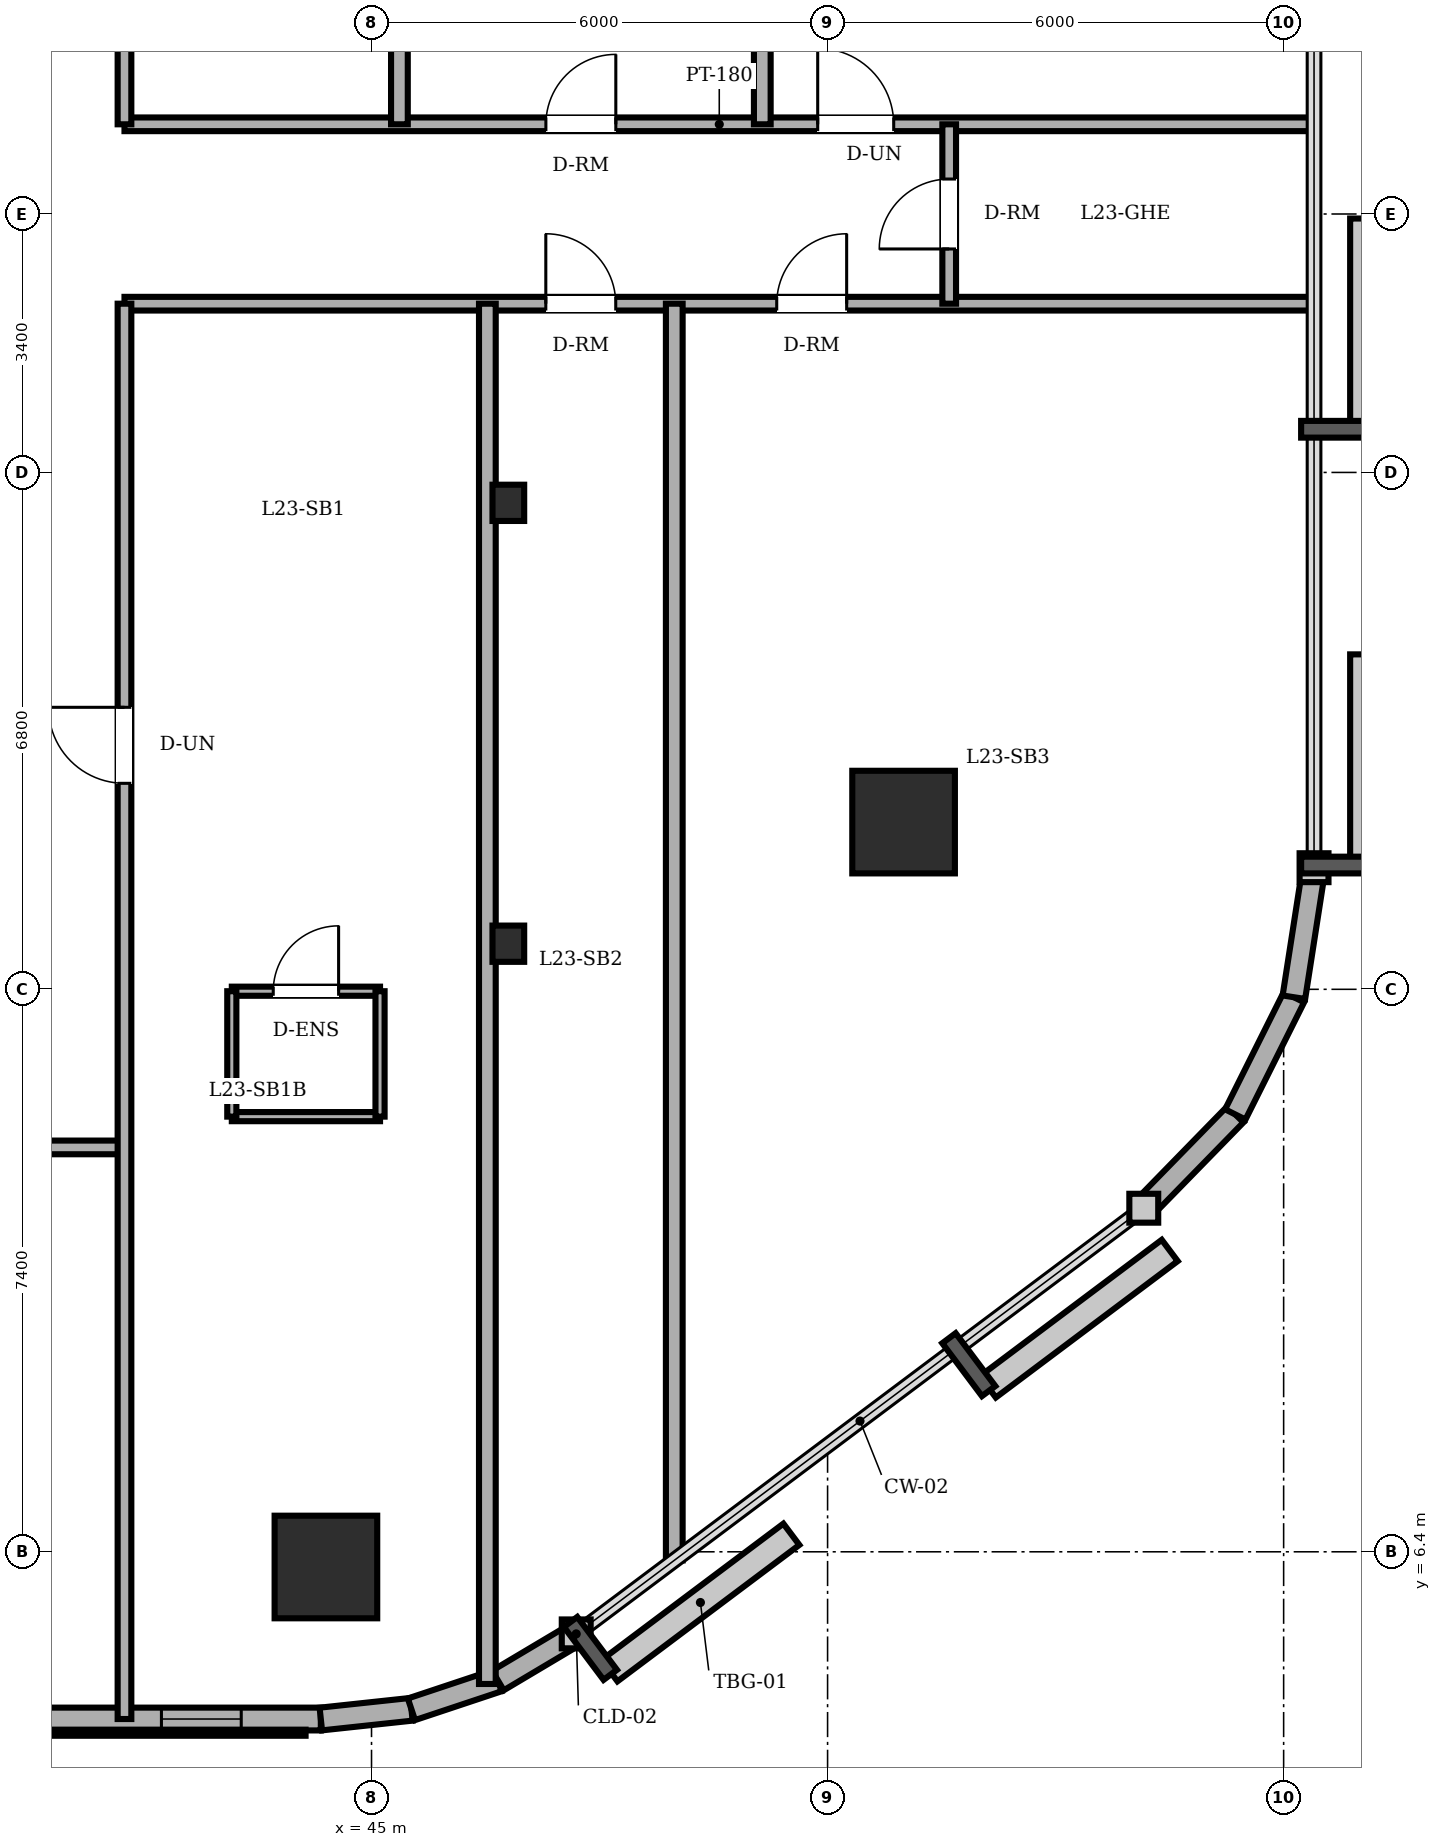
"""IFC4 building model, lengths in metres.
Left out: names, types, materials, properties, quantities, classifications, styles, units other than length and angle.
Written with IfcOpenShell. Run it as: python <this file> out.ifc"""

import sys

from ifc_helpers import new_model, si_unit, direction, frame, frame_2d, origin, origin_2d, place, context, subcontext, project, spatial, rectangle, circle, i_section, extrude, element, fill, save


model = new_model("IFC4")
c1 = context("Model", 3, precision=1e-05, world=origin(), true_north=direction((0.0, 1.0)))
c2 = subcontext(c1, "Body", "Model", "MODEL_VIEW")
j1 = project(units=[si_unit("LENGTHUNIT", "METRE"), si_unit("PLANEANGLEUNIT", "RADIAN")], contexts=[c1])
p1 = place(None, origin())
s1 = spatial("IfcSite", under=j1, at=p1, CompositionType="ELEMENT")
p2 = place(p1, origin())
s2 = spatial("IfcBuilding", under=s1, at=p2, CompositionType="ELEMENT")
p3 = place(p2, frame((0.0, 0.0, 89.9)))
s3 = spatial("IfcBuildingStorey", under=s2, at=p3, CompositionType="ELEMENT", Elevation=89.9)
for number, where, z_axis, x_axis in (
    (1, (44.4, 6.2, 0.0), (0.0, 0.0, 1.0), (1.0, 0.0, 0.0)),
    (2, (52.0, 16.0, 0.0), (0.0, 0.0, 1.0), (1.0, 0.0, 0.0)),
):
    element("IfcColumn", number, at=place(p3, frame(where, z_axis=z_axis, x_axis=x_axis)), inside=s3, PredefinedType="COLUMN", context=c2, shape_type="SweptSolid", body=[
        extrude(circle(Radius=0.675, at=origin_2d()), origin(), (0.0, 0.0, 1.0), 3.6),
    ])
for number, where, z_axis, x_axis in (
    (3, (46.8, 14.4, 0.0), (0.0, 0.0, 1.0), (1.0, 0.0, 0.0)),
    (4, (46.8, 20.2, 0.0), (0.0, 0.0, 1.0), (1.0, 0.0, 0.0)),
):
    element("IfcColumn", number, at=place(p3, frame(where, z_axis=z_axis, x_axis=x_axis)), inside=s3, PredefinedType="COLUMN", context=c2, shape_type="SweptSolid", body=[
        extrude(i_section(OverallWidth=0.417, OverallDepth=0.477, WebThickness=0.036, FlangeThickness=0.057, FilletRadius=0.015, at=origin_2d()), origin(), (0.0, 0.0, 1.0), 3.6),
    ])
p4 = place(p3, frame((14.4, 4.2, 0.0), z_axis=(0.0, 0.0, 1.0), x_axis=(1.0, 0.0, 0.0)))
e5 = element("IfcWall", 5, at=p4, inside=s3, PredefinedType="SOLIDWALL", context=c2, shape_type="SweptSolid", body=[
    extrude(rectangle(XDim=29.933, YDim=0.3, at=frame_2d((14.967, 0.0))), origin(), (0.0, 0.0, 1.0), 3.4),
])
p5 = place(p4, frame((6.425, 0.0, 0.0)))
e6 = element("IfcOpeningElement", 6, at=p5, cuts=e5, PredefinedType="OPENING", context=c2, shape_type="SweptSolid", body=[
    extrude(rectangle(XDim=0.95, YDim=2.2, at=frame_2d((0.475, 1.1))), frame((0.0, 0.16, 0.0), z_axis=(0.0, -1.0, 0.0), x_axis=(1.0, 0.0, 0.0)), (0.0, 0.0, 1.0), 0.32),
])
p6 = place(p4, frame((2.342, 0.0, 0.85)))
e7 = element("IfcOpeningElement", 7, at=p6, cuts=e5, PredefinedType="OPENING", context=c2, shape_type="SweptSolid", body=[
    extrude(rectangle(XDim=1.65, YDim=1.55, at=frame_2d((0.825, 0.775))), frame((0.0, 0.16, 0.0), z_axis=(0.0, -1.0, 0.0), x_axis=(1.0, 0.0, 0.0)), (0.0, 0.0, 1.0), 0.32),
])
p7 = place(p4, frame((9.875, 0.0, 0.85)))
e8 = element("IfcOpeningElement", 8, at=p7, cuts=e5, PredefinedType="OPENING", context=c2, shape_type="SweptSolid", body=[
    extrude(rectangle(XDim=1.65, YDim=1.55, at=frame_2d((0.825, 0.775))), frame((0.0, 0.16, 0.0), z_axis=(0.0, -1.0, 0.0), x_axis=(1.0, 0.0, 0.0)), (0.0, 0.0, 1.0), 0.32),
])
p8 = place(p4, frame((16.692, 0.0, 0.85)))
e9 = element("IfcOpeningElement", 9, at=p8, cuts=e5, PredefinedType="OPENING", context=c2, shape_type="SweptSolid", body=[
    extrude(rectangle(XDim=1.65, YDim=1.55, at=frame_2d((0.825, 0.775))), frame((0.0, 0.16, 0.0), z_axis=(0.0, -1.0, 0.0), x_axis=(1.0, 0.0, 0.0)), (0.0, 0.0, 1.0), 0.32),
])
p9 = place(p4, frame((21.608, 0.0, 0.85)))
e10 = element("IfcOpeningElement", 10, at=p9, cuts=e5, PredefinedType="OPENING", context=c2, shape_type="SweptSolid", body=[
    extrude(rectangle(XDim=1.65, YDim=1.55, at=frame_2d((0.825, 0.775))), frame((0.0, 0.16, 0.0), z_axis=(0.0, -1.0, 0.0), x_axis=(1.0, 0.0, 0.0)), (0.0, 0.0, 1.0), 0.32),
])
p10 = place(p4, frame((27.836, 0.0, 0.85)))
e11 = element("IfcOpeningElement", 11, at=p10, cuts=e5, PredefinedType="OPENING", context=c2, shape_type="SweptSolid", body=[
    extrude(rectangle(XDim=1.05, YDim=1.55, at=frame_2d((0.525, 0.775))), frame((0.0, 0.16, 0.0), z_axis=(0.0, -1.0, 0.0), x_axis=(1.0, 0.0, 0.0)), (0.0, 0.0, 1.0), 0.32),
])
p11 = place(p3, frame((44.333, 4.2, 0.0), z_axis=(0.0, 0.0, 1.0), x_axis=(0.994289103787, 0.106720092254, 0.0)))
e12 = element("IfcWall", 12, at=p11, inside=s3, PredefinedType="SOLIDWALL", context=c2, shape_type="SweptSolid", body=[
    extrude(rectangle(XDim=1.199, YDim=0.3, at=frame_2d((0.599, 0.0))), origin(), (0.0, 0.0, 1.0), 3.4),
])
p12 = place(p3, frame((45.525, 4.328, 0.0), z_axis=(0.0, 0.0, 1.0), x_axis=(0.948744332129, 0.316044604847, 0.0)))
e13 = element("IfcWall", 13, at=p12, inside=s3, PredefinedType="SOLIDWALL", context=c2, shape_type="SweptSolid", body=[
    extrude(rectangle(XDim=1.2, YDim=0.3, at=frame_2d((0.6, 0.0))), origin(), (0.0, 0.0, 1.0), 3.4),
])
p13 = place(p3, frame((46.663, 4.707, 0.0), z_axis=(0.0, 0.0, 1.0), x_axis=(0.859320591642, 0.511437308749, 0.0)))
e14 = element("IfcWall", 14, at=p13, inside=s3, PredefinedType="SOLIDWALL", context=c2, shape_type="SweptSolid", body=[
    extrude(rectangle(XDim=1.199, YDim=0.3, at=frame_2d((0.599, 0.0))), origin(), (0.0, 0.0, 1.0), 3.4),
])
for number, where, z_axis, x_axis in (
    (15, (55.16, 10.92, 0.0), (0.0, 0.0, 1.0), (0.698, 0.716, 0.0)),
    (16, (56.364, 12.154, 0.0), (0.0, 0.0, 1.0), (0.447, 0.894, 0.0)),
):
    element("IfcWall", number, at=place(p3, frame(where, z_axis=z_axis, x_axis=x_axis)), inside=s3, PredefinedType="SOLIDWALL", context=c2, shape_type="SweptSolid", body=[
        extrude(rectangle(XDim=1.724, YDim=0.3, at=frame_2d((0.862, 0.0))), origin(), (0.0, 0.0, 1.0), 3.4),
    ])
p14 = place(p3, frame((57.135, 13.696, 0.0), z_axis=(0.0, 0.0, 1.0), x_axis=(0.153620989032, 0.988129845581, 0.0)))
e17 = element("IfcWall", 17, at=p14, inside=s3, PredefinedType="SOLIDWALL", context=c2, shape_type="SweptSolid", body=[
    extrude(rectangle(XDim=1.724, YDim=0.3, at=frame_2d((0.862, 0.0))), origin(), (0.0, 0.0, 1.0), 3.4),
])
p15 = place(p3, frame((43.162, 13.775, 0.0), z_axis=(0.0, 0.0, 1.0), x_axis=(1.0, 0.0, 0.0)))
e18 = element("IfcWall", 18, at=p15, inside=s3, PredefinedType="PARTITIONING", context=c2, shape_type="SweptSolid", body=[
    extrude(rectangle(XDim=1.95, YDim=0.12, at=frame_2d((0.975, 0.0))), origin(), (0.0, 0.0, 1.0), 3.4),
])
p16 = place(p15, frame((0.545, 0.0, 0.0)))
e19 = element("IfcOpeningElement", 19, at=p16, cuts=e18, PredefinedType="OPENING", context=c2, shape_type="SweptSolid", body=[
    extrude(rectangle(XDim=0.86, YDim=2.1, at=frame_2d((0.43, 1.05))), frame((0.0, 0.07, 0.0), z_axis=(0.0, -1.0, 0.0), x_axis=(1.0, 0.0, 0.0)), (0.0, 0.0, 1.0), 0.14),
])
p17 = place(p3, frame((45.112, 12.125, 0.0), z_axis=(0.0, 0.0, 1.0), x_axis=(-1.0, 0.0, 0.0)))
e20 = element("IfcWall", 20, at=p17, inside=s3, PredefinedType="PARTITIONING", context=c2, shape_type="SweptSolid", body=[
    extrude(rectangle(XDim=1.95, YDim=0.12, at=frame_2d((0.975, 0.0))), origin(), (0.0, 0.0, 1.0), 3.4),
])
for number, where, z_axis, x_axis in (
    (21, (43.162, 13.775, 0.0), (0.0, 0.0, 1.0), (0.0, -1.0, 0.0)),
    (22, (45.112, 12.125, 0.0), (0.0, 0.0, 1.0), (0.0, 1.0, 0.0)),
):
    element("IfcWall", number, at=place(p3, frame(where, z_axis=z_axis, x_axis=x_axis)), inside=s3, PredefinedType="PARTITIONING", context=c2, shape_type="SweptSolid", body=[
        extrude(rectangle(XDim=1.65, YDim=0.12, at=frame_2d((0.825, 0.0))), origin(), (0.0, 0.0, 1.0), 3.4),
    ])
p18 = place(p3, frame((8.8, 11.72, 0.0), z_axis=(0.0, 0.0, 1.0), x_axis=(1.0, 0.0, 0.0)))
e23 = element("IfcWall", 23, at=p18, inside=s3, PredefinedType="PARTITIONING", context=c2, shape_type="SweptSolid", body=[
    extrude(rectangle(XDim=32.95, YDim=0.18, at=frame_2d((16.475, 0.0))), origin(), (0.0, 0.0, 1.0), 3.4),
])
p19 = place(p18, frame((15.84, 0.0, 0.0)))
e24 = element("IfcOpeningElement", 24, at=p19, cuts=e23, PredefinedType="OPENING", context=c2, shape_type="SweptSolid", body=[
    extrude(rectangle(XDim=0.92, YDim=2.1, at=frame_2d((0.46, 1.05))), frame((0.0, 0.1, 0.0), z_axis=(0.0, -1.0, 0.0), x_axis=(1.0, 0.0, 0.0)), (0.0, 0.0, 1.0), 0.2),
])
p20 = place(p18, frame((3.101, 0.0, 0.0)))
e25 = element("IfcOpeningElement", 25, at=p20, cuts=e23, PredefinedType="OPENING", context=c2, shape_type="SweptSolid", body=[
    extrude(rectangle(XDim=0.92, YDim=2.1, at=frame_2d((0.46, 1.05))), frame((0.0, 0.1, 0.0), z_axis=(0.0, -1.0, 0.0), x_axis=(1.0, 0.0, 0.0)), (0.0, 0.0, 1.0), 0.2),
])
p21 = place(p18, frame((9.701, 0.0, 0.0)))
e26 = element("IfcOpeningElement", 26, at=p21, cuts=e23, PredefinedType="OPENING", context=c2, shape_type="SweptSolid", body=[
    extrude(rectangle(XDim=0.92, YDim=2.1, at=frame_2d((0.46, 1.05))), frame((0.0, 0.1, 0.0), z_axis=(0.0, -1.0, 0.0), x_axis=(1.0, 0.0, 0.0)), (0.0, 0.0, 1.0), 0.2),
])
p22 = place(p18, frame((24.855, 0.0, 0.0)))
e27 = element("IfcOpeningElement", 27, at=p22, cuts=e23, PredefinedType="OPENING", context=c2, shape_type="SweptSolid", body=[
    extrude(rectangle(XDim=0.92, YDim=2.1, at=frame_2d((0.46, 1.05))), frame((0.0, 0.1, 0.0), z_axis=(0.0, -1.0, 0.0), x_axis=(1.0, 0.0, 0.0)), (0.0, 0.0, 1.0), 0.2),
])
p23 = place(p3, frame((41.75, 22.82, 0.0), z_axis=(0.0, 0.0, 1.0), x_axis=(1.0, 0.0, 0.0)))
e28 = element("IfcWall", 28, at=p23, inside=s3, PredefinedType="PARTITIONING", context=c2, shape_type="SweptSolid", body=[
    extrude(rectangle(XDim=15.65, YDim=0.18, at=frame_2d((7.825, 0.0))), origin(), (0.0, 0.0, 1.0), 3.4),
])
p24 = place(p23, frame((5.543, 0.0, 0.0)))
e29 = element("IfcOpeningElement", 29, at=p24, cuts=e28, PredefinedType="OPENING", context=c2, shape_type="SweptSolid", body=[
    extrude(rectangle(XDim=0.92, YDim=2.1, at=frame_2d((0.46, 1.05))), frame((0.0, 0.1, 0.0), z_axis=(0.0, -1.0, 0.0), x_axis=(1.0, 0.0, 0.0)), (0.0, 0.0, 1.0), 0.2),
])
p25 = place(p23, frame((8.581, 0.0, 0.0)))
e30 = element("IfcOpeningElement", 30, at=p25, cuts=e28, PredefinedType="OPENING", context=c2, shape_type="SweptSolid", body=[
    extrude(rectangle(XDim=0.92, YDim=2.1, at=frame_2d((0.46, 1.05))), frame((0.0, 0.1, 0.0), z_axis=(0.0, -1.0, 0.0), x_axis=(1.0, 0.0, 0.0)), (0.0, 0.0, 1.0), 0.2),
])
p26 = place(p3, frame((41.75, 25.18, 0.0), z_axis=(0.0, 0.0, 1.0), x_axis=(1.0, 0.0, 0.0)))
e31 = element("IfcWall", 31, at=p26, inside=s3, PredefinedType="PARTITIONING", context=c2, shape_type="SweptSolid", body=[
    extrude(rectangle(XDim=15.65, YDim=0.18, at=frame_2d((7.825, 0.0))), origin(), (0.0, 0.0, 1.0), 3.4),
])
p27 = place(p26, frame((5.544, 0.0, 0.0)))
e32 = element("IfcOpeningElement", 32, at=p27, cuts=e31, PredefinedType="OPENING", context=c2, shape_type="SweptSolid", body=[
    extrude(rectangle(XDim=0.92, YDim=2.1, at=frame_2d((0.46, 1.05))), frame((0.0, 0.1, 0.0), z_axis=(0.0, -1.0, 0.0), x_axis=(1.0, 0.0, 0.0)), (0.0, 0.0, 1.0), 0.2),
])
p28 = place(p26, frame((9.12, 0.0, 0.0)))
e33 = element("IfcOpeningElement", 33, at=p28, cuts=e31, PredefinedType="OPENING", context=c2, shape_type="SweptSolid", body=[
    extrude(rectangle(XDim=1.0, YDim=2.15, at=frame_2d((0.5, 1.075))), frame((0.0, 0.1, 0.0), z_axis=(0.0, -1.0, 0.0), x_axis=(1.0, 0.0, 0.0)), (0.0, 0.0, 1.0), 0.2),
])
p29 = place(p3, frame((41.75, 4.2, 0.0), z_axis=(0.0, 0.0, 1.0), x_axis=(0.0, 1.0, 0.0)))
e34 = element("IfcWall", 34, at=p29, inside=s3, PredefinedType="PARTITIONING", context=c2, shape_type="SweptSolid", body=[
    extrude(rectangle(XDim=18.62, YDim=0.18, at=frame_2d((9.31, 0.0))), origin(), (0.0, 0.0, 1.0), 3.4),
])
p30 = place(p29, frame((12.31, 0.0, 0.0)))
e35 = element("IfcOpeningElement", 35, at=p30, cuts=e34, PredefinedType="OPENING", context=c2, shape_type="SweptSolid", body=[
    extrude(rectangle(XDim=1.0, YDim=2.15, at=frame_2d((0.5, 1.075))), frame((0.0, 0.1, 0.0), z_axis=(0.0, -1.0, 0.0), x_axis=(1.0, 0.0, 0.0)), (0.0, 0.0, 1.0), 0.2),
])
p31 = place(p3, frame((41.75, 25.18, 0.0), z_axis=(0.0, 0.0, 1.0), x_axis=(0.0, 1.0, 0.0)))
e36 = element("IfcWall", 36, at=p31, inside=s3, PredefinedType="PARTITIONING", context=c2, shape_type="SweptSolid", body=[
    extrude(rectangle(XDim=18.62, YDim=0.18, at=frame_2d((9.31, 0.0))), origin(), (0.0, 0.0, 1.0), 3.4),
])
p32 = place(p31, frame((5.31, 0.0, 0.0)))
e37 = element("IfcOpeningElement", 37, at=p32, cuts=e36, PredefinedType="OPENING", context=c2, shape_type="SweptSolid", body=[
    extrude(rectangle(XDim=1.0, YDim=2.15, at=frame_2d((0.5, 1.075))), frame((0.0, 0.1, 0.0), z_axis=(0.0, -1.0, 0.0), x_axis=(1.0, 0.0, 0.0)), (0.0, 0.0, 1.0), 0.2),
])
p33 = place(p3, frame((45.367, 25.18, 0.0), z_axis=(0.0, 0.0, 1.0), x_axis=(0.0, 1.0, 0.0)))
e38 = element("IfcWall", 38, at=p33, inside=s3, PredefinedType="PARTITIONING", context=c2, shape_type="SweptSolid", body=[
    extrude(rectangle(XDim=18.509, YDim=0.22, at=frame_2d((9.254, 0.0))), origin(), (0.0, 0.0, 1.0), 2.882),
])
p34 = place(p3, frame((46.524, 4.661, 0.0), z_axis=(0.0, 0.0, 1.0), x_axis=(0.0, 1.0, 0.0)))
e39 = element("IfcWall", 39, at=p34, inside=s3, PredefinedType="PARTITIONING", context=c2, shape_type="SweptSolid", body=[
    extrude(rectangle(XDim=18.159, YDim=0.22, at=frame_2d((9.08, 0.0))), origin(), (0.0, 0.0, 1.0), 2.882),
])
p35 = place(p3, frame((48.983, 6.287, 0.0), z_axis=(0.0, 0.0, 1.0), x_axis=(0.0, 1.0, 0.0)))
e40 = element("IfcWall", 40, at=p35, inside=s3, PredefinedType="PARTITIONING", context=c2, shape_type="SweptSolid", body=[
    extrude(rectangle(XDim=16.533, YDim=0.22, at=frame_2d((8.267, 0.0))), origin(), (0.0, 0.0, 1.0), 3.4),
])
p36 = place(p3, frame((50.141, 25.18, 0.0), z_axis=(0.0, 0.0, 1.0), x_axis=(0.0, 1.0, 0.0)))
e41 = element("IfcWall", 41, at=p36, inside=s3, PredefinedType="PARTITIONING", context=c2, shape_type="SweptSolid", body=[
    extrude(rectangle(XDim=15.664, YDim=0.22, at=frame_2d((7.832, 0.0))), origin(), (0.0, 0.0, 1.0), 3.4),
])
p37 = place(p3, frame((52.6, 22.82, 0.0), z_axis=(0.0, 0.0, 1.0), x_axis=(0.0, 1.0, 0.0)))
e42 = element("IfcWall", 42, at=p37, inside=s3, PredefinedType="PARTITIONING", context=c2, shape_type="SweptSolid", body=[
    extrude(rectangle(XDim=2.36, YDim=0.18, at=frame_2d((1.18, 0.0))), origin(), (0.0, 0.0, 1.0), 3.4),
])
p38 = place(p37, frame((0.72, 0.0, 0.0)))
e43 = element("IfcOpeningElement", 43, at=p38, cuts=e42, PredefinedType="OPENING", context=c2, shape_type="SweptSolid", body=[
    extrude(rectangle(XDim=0.92, YDim=2.1, at=frame_2d((0.46, 1.05))), frame((0.0, 0.1, 0.0), z_axis=(0.0, -1.0, 0.0), x_axis=(1.0, 0.0, 0.0)), (0.0, 0.0, 1.0), 0.2),
])
p39 = place(p10, origin())
e44 = element("IfcWindow", 44, at=p39, inside=s3, PartitioningType="SINGLE_PANEL", PredefinedType="WINDOW", context=c2, shape_type="SweptSolid", body=[
    extrude(rectangle(XDim=1.05, YDim=1.55, at=frame_2d((0.525, 0.775))), frame((0.0, 0.03, 0.0), z_axis=(0.0, -1.0, 0.0), x_axis=(1.0, 0.0, 0.0)), (0.0, 0.0, 1.0), 0.06),
])
fill(e11, e44)
p40 = place(p16, origin())
e45 = element("IfcDoor", 45, at=p40, inside=s3, OperationType="SINGLE_SWING_RIGHT", PredefinedType="DOOR", context=c2, shape_type="SweptSolid", body=[
    extrude(rectangle(XDim=0.86, YDim=2.1, at=frame_2d((0.43, 1.05))), frame((0.0, 0.025, 0.0), z_axis=(0.0, -1.0, 0.0), x_axis=(1.0, 0.0, 0.0)), (0.0, 0.0, 1.0), 0.05),
])
fill(e19, e45)
p41 = place(p27, origin())
e46 = element("IfcDoor", 46, at=p41, inside=s3, OperationType="SINGLE_SWING_RIGHT", PredefinedType="DOOR", context=c2, shape_type="SweptSolid", body=[
    extrude(rectangle(XDim=0.92, YDim=2.1, at=frame_2d((0.46, 1.05))), frame((0.0, 0.025, 0.0), z_axis=(0.0, -1.0, 0.0), x_axis=(1.0, 0.0, 0.0)), (0.0, 0.0, 1.0), 0.05),
])
fill(e32, e46)
p42 = place(p28, origin())
e47 = element("IfcDoor", 47, at=p42, inside=s3, OperationType="SINGLE_SWING_LEFT", PredefinedType="DOOR", context=c2, shape_type="SweptSolid", body=[
    extrude(rectangle(XDim=1.0, YDim=2.15, at=frame_2d((0.5, 1.075))), frame((0.0, 0.025, 0.0), z_axis=(0.0, -1.0, 0.0), x_axis=(1.0, 0.0, 0.0)), (0.0, 0.0, 1.0), 0.05),
])
fill(e33, e47)
p43 = place(p30, origin())
e48 = element("IfcDoor", 48, at=p43, inside=s3, OperationType="SINGLE_SWING_RIGHT", PredefinedType="DOOR", context=c2, shape_type="SweptSolid", body=[
    extrude(rectangle(XDim=1.0, YDim=2.15, at=frame_2d((0.5, 1.075))), frame((0.0, 0.025, 0.0), z_axis=(0.0, -1.0, 0.0), x_axis=(1.0, 0.0, 0.0)), (0.0, 0.0, 1.0), 0.05),
])
fill(e35, e48)
p44 = place(p24, origin())
e49 = element("IfcDoor", 49, at=p44, inside=s3, OperationType="SINGLE_SWING_LEFT", PredefinedType="DOOR", context=c2, shape_type="SweptSolid", body=[
    extrude(rectangle(XDim=0.92, YDim=2.1, at=frame_2d((0.46, 1.05))), frame((0.0, 0.025, 0.0), z_axis=(0.0, -1.0, 0.0), x_axis=(1.0, 0.0, 0.0)), (0.0, 0.0, 1.0), 0.05),
])
fill(e29, e49)
p45 = place(p25, origin())
e50 = element("IfcDoor", 50, at=p45, inside=s3, OperationType="SINGLE_SWING_RIGHT", PredefinedType="DOOR", context=c2, shape_type="SweptSolid", body=[
    extrude(rectangle(XDim=0.92, YDim=2.1, at=frame_2d((0.46, 1.05))), frame((0.0, 0.025, 0.0), z_axis=(0.0, -1.0, 0.0), x_axis=(1.0, 0.0, 0.0)), (0.0, 0.0, 1.0), 0.05),
])
fill(e30, e50)
p46 = place(p38, origin())
e51 = element("IfcDoor", 51, at=p46, inside=s3, OperationType="SINGLE_SWING_LEFT", PredefinedType="DOOR", context=c2, shape_type="SweptSolid", body=[
    extrude(rectangle(XDim=0.92, YDim=2.1, at=frame_2d((0.46, 1.05))), frame((0.0, 0.025, 0.0), z_axis=(0.0, -1.0, 0.0), x_axis=(1.0, 0.0, 0.0)), (0.0, 0.0, 1.0), 0.05),
])
fill(e43, e51)
save(model, sys.argv[1])
